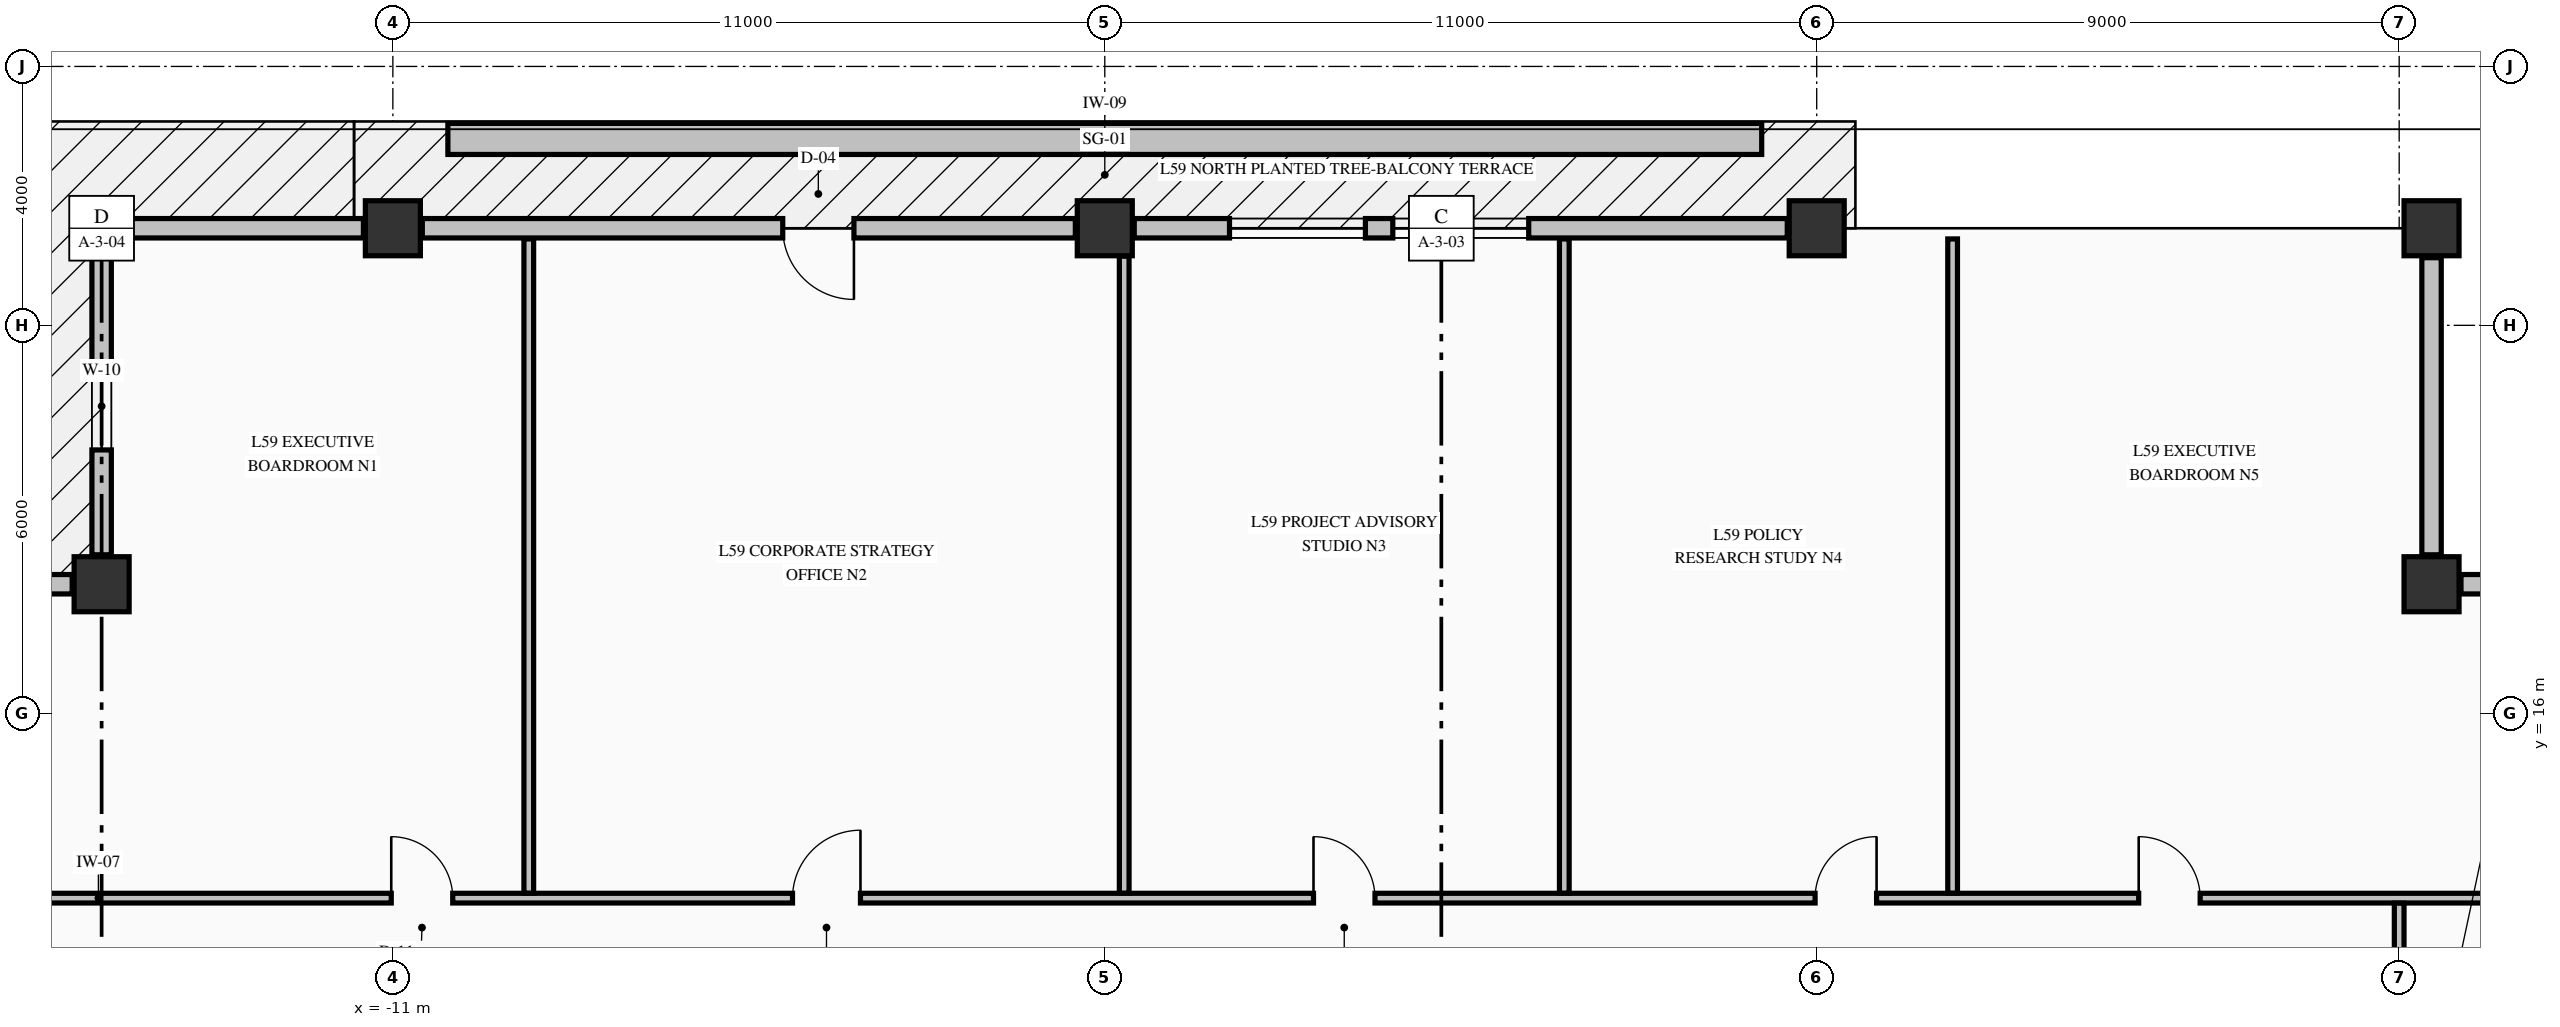
"""IFC4 building model, lengths in metres.
Left out: names, types, materials, properties, quantities, classifications, styles, units other than length and angle.
Written with IfcOpenShell. Run it as: python <this file> out.ifc"""

import sys

from ifc_helpers import new_model, si_unit, direction, frame, frame_2d, origin, origin_2d, place, context, subcontext, project, spatial, rectangle, extrude, element, fill, save


model = new_model("IFC4")
c1 = context("Model", 3, precision=1e-05, world=origin(), true_north=direction((0.0, 1.0)))
c2 = subcontext(c1, "Body", "Model", "MODEL_VIEW")
j1 = project(units=[si_unit("LENGTHUNIT", "METRE"), si_unit("PLANEANGLEUNIT", "RADIAN")], contexts=[c1])
p1 = place(None, origin())
s1 = spatial("IfcSite", under=j1, at=p1, CompositionType="ELEMENT")
p2 = place(p1, origin())
s2 = spatial("IfcBuilding", under=s1, at=p2, CompositionType="ELEMENT")
p3 = place(p2, frame((0.0, 0.0, 226.82)))
s3 = spatial("IfcBuildingStorey", under=s2, at=p3, CompositionType="ELEMENT", Elevation=226.82)
for number, where, z_axis, x_axis in (
    (1, (-15.5, 23.5, -0.425), (0.0, 0.0, 1.0), (1.0, 0.0, 0.0)),
    (2, (-11.0, 23.5, -0.425), (0.0, 0.0, 1.0), (1.0, 0.0, 0.0)),
    (3, (0.0, 23.5, -0.425), (0.0, 0.0, 1.0), (1.0, 0.0, 0.0)),
    (4, (11.0, 23.5, -0.425), (0.0, 0.0, 1.0), (1.0, 0.0, 0.0)),
    (5, (20.5, 23.5, -0.425), (0.0, 0.0, 1.0), (1.0, 0.0, 0.0)),
    (6, (20.5, 18.0, -0.425), (0.0, 0.0, 1.0), (1.0, 0.0, 0.0)),
    (7, (-15.5, 18.0, -0.425), (0.0, 0.0, 1.0), (1.0, 0.0, 0.0)),
):
    element("IfcColumn", number, at=place(p3, frame(where, z_axis=z_axis, x_axis=x_axis)), inside=s3, PredefinedType="COLUMN", context=c2, shape_type="SweptSolid", body=[
        extrude(rectangle(XDim=0.85, YDim=0.85, at=origin_2d()), origin(), (0.0, 0.0, 1.0), 3.405),
    ])
for number, where, z_axis, x_axis in (
    (8, (25.545, 18.0, 0.0), (0.0, 0.0, 1.0), (-1.0, 0.0, 0.0)),
    (9, (20.5, 18.455, 0.0), (0.0, 0.0, 1.0), (0.0, 1.0, 0.0)),
):
    element("IfcWall", number, at=place(p3, frame(where, z_axis=z_axis, x_axis=x_axis)), inside=s3, PredefinedType="STANDARD", context=c2, shape_type="SweptSolid", body=[
        extrude(rectangle(XDim=4.59, YDim=0.3, at=frame_2d((2.295, 0.0))), origin(), (0.0, 0.0, 1.0), 1.172),
    ])
p4 = place(p3, frame((-15.5, 23.045, 0.0), z_axis=(0.0, 0.0, 1.0), x_axis=(0.0, -1.0, 0.0)))
e10 = element("IfcWall", 10, at=p4, inside=s3, PredefinedType="STANDARD", context=c2, shape_type="SweptSolid", body=[
    extrude(rectangle(XDim=4.59, YDim=0.3, at=frame_2d((2.295, 0.0))), origin(), (0.0, 0.0, 1.0), 2.372),
])
p5 = place(p4, frame((1.62, 0.0, 0.68)))
e11 = element("IfcOpeningElement", 11, at=p5, cuts=e10, PredefinedType="OPENING", context=c2, shape_type="SweptSolid", body=[
    extrude(rectangle(XDim=1.35, YDim=1.42, at=frame_2d((0.675, 0.71))), frame((0.0, 0.16, 0.0), z_axis=(0.0, -1.0, 0.0), x_axis=(1.0, 0.0, 0.0)), (0.0, 0.0, 1.0), 0.32),
])
p6 = place(p3, frame((-15.955, 18.0, 0.0), z_axis=(0.0, 0.0, 1.0), x_axis=(-1.0, 0.0, 0.0)))
e12 = element("IfcWall", 12, at=p6, inside=s3, PredefinedType="STANDARD", context=c2, shape_type="SweptSolid", body=[
    extrude(rectangle(XDim=4.59, YDim=0.3, at=frame_2d((2.295, 0.0))), origin(), (0.0, 0.0, 1.0), 2.372),
])
p7 = place(p6, frame((1.62, 0.0, 0.68)))
e13 = element("IfcOpeningElement", 13, at=p7, cuts=e12, PredefinedType="OPENING", context=c2, shape_type="SweptSolid", body=[
    extrude(rectangle(XDim=1.35, YDim=1.42, at=frame_2d((0.675, 0.71))), frame((0.0, 0.16, 0.0), z_axis=(0.0, -1.0, 0.0), x_axis=(1.0, 0.0, 0.0)), (0.0, 0.0, 1.0), 0.32),
])
p8 = place(p3, frame((-11.455, 23.5, 0.0), z_axis=(0.0, 0.0, 1.0), x_axis=(-1.0, 0.0, 0.0)))
e14 = element("IfcWall", 14, at=p8, inside=s3, PredefinedType="STANDARD", context=c2, shape_type="SweptSolid", body=[
    extrude(rectangle(XDim=3.59, YDim=0.3, at=frame_2d((1.795, 0.0))), origin(), (0.0, 0.0, 1.0), 2.372),
])
p9 = place(p3, frame((-0.455, 23.5, 0.0), z_axis=(0.0, 0.0, 1.0), x_axis=(-1.0, 0.0, 0.0)))
e15 = element("IfcWall", 15, at=p9, inside=s3, PredefinedType="STANDARD", context=c2, shape_type="SweptSolid", body=[
    extrude(rectangle(XDim=10.09, YDim=0.3, at=frame_2d((5.045, 0.0))), origin(), (0.0, 0.0, 1.0), 2.372),
])
p10 = place(p9, frame((3.421, 0.0, 0.0)))
e16 = element("IfcOpeningElement", 16, at=p10, cuts=e15, PredefinedType="OPENING", context=c2, shape_type="SweptSolid", body=[
    extrude(rectangle(XDim=1.1, YDim=2.15, at=frame_2d((0.55, 1.075))), frame((0.0, 0.16, 0.0), z_axis=(0.0, -1.0, 0.0), x_axis=(1.0, 0.0, 0.0)), (0.0, 0.0, 1.0), 0.32),
])
p11 = place(p3, frame((10.545, 23.5, 0.0), z_axis=(0.0, 0.0, 1.0), x_axis=(-1.0, 0.0, 0.0)))
e17 = element("IfcWall", 17, at=p11, inside=s3, PredefinedType="STANDARD", context=c2, shape_type="SweptSolid", body=[
    extrude(rectangle(XDim=10.09, YDim=0.3, at=frame_2d((5.045, 0.0))), origin(), (0.0, 0.0, 1.0), 2.372),
])
p12 = place(p11, frame((3.995, 0.0, 0.7)))
e18 = element("IfcOpeningElement", 18, at=p12, cuts=e17, PredefinedType="OPENING", context=c2, shape_type="SweptSolid", body=[
    extrude(rectangle(XDim=2.1, YDim=1.5, at=frame_2d((1.05, 0.75))), frame((0.0, 0.16, 0.0), z_axis=(0.0, -1.0, 0.0), x_axis=(1.0, 0.0, 0.0)), (0.0, 0.0, 1.0), 0.32),
])
p13 = place(p11, frame((6.518, 0.0, 0.7)))
e19 = element("IfcOpeningElement", 19, at=p13, cuts=e17, PredefinedType="OPENING", context=c2, shape_type="SweptSolid", body=[
    extrude(rectangle(XDim=2.1, YDim=1.5, at=frame_2d((1.05, 0.75))), frame((0.0, 0.16, 0.0), z_axis=(0.0, -1.0, 0.0), x_axis=(1.0, 0.0, 0.0)), (0.0, 0.0, 1.0), 0.32),
])
p14 = place(p3, frame((-20.075, 13.15, 0.0), z_axis=(0.0, 0.0, 1.0), x_axis=(1.0, 0.0, 0.0)))
e20 = element("IfcWall", 20, at=p14, inside=s3, PredefinedType="PARTITIONING", context=c2, shape_type="SweptSolid", body=[
    extrude(rectangle(XDim=45.91, YDim=0.15, at=frame_2d((22.955, 0.0))), origin(), (0.0, 0.0, 1.0), 2.98),
])
p15 = place(p14, frame((9.05, 0.0, 0.0)))
e21 = element("IfcOpeningElement", 21, at=p15, cuts=e20, PredefinedType="OPENING", context=c2, shape_type="SweptSolid", body=[
    extrude(rectangle(XDim=0.95, YDim=2.15, at=frame_2d((0.475, 1.075))), frame((0.0, 0.085, 0.0), z_axis=(0.0, -1.0, 0.0), x_axis=(1.0, 0.0, 0.0)), (0.0, 0.0, 1.0), 0.17),
])
p16 = place(p14, frame((15.25, 0.0, 0.0)))
e22 = element("IfcOpeningElement", 22, at=p16, cuts=e20, PredefinedType="OPENING", context=c2, shape_type="SweptSolid", body=[
    extrude(rectangle(XDim=1.05, YDim=2.15, at=frame_2d((0.525, 1.075))), frame((0.0, 0.085, 0.0), z_axis=(0.0, -1.0, 0.0), x_axis=(1.0, 0.0, 0.0)), (0.0, 0.0, 1.0), 0.17),
])
p17 = place(p14, frame((23.3, 0.0, 0.0)))
e23 = element("IfcOpeningElement", 23, at=p17, cuts=e20, PredefinedType="OPENING", context=c2, shape_type="SweptSolid", body=[
    extrude(rectangle(XDim=0.95, YDim=2.15, at=frame_2d((0.475, 1.075))), frame((0.0, 0.085, 0.0), z_axis=(0.0, -1.0, 0.0), x_axis=(1.0, 0.0, 0.0)), (0.0, 0.0, 1.0), 0.17),
])
p18 = place(p14, frame((31.05, 0.0, 0.0)))
e24 = element("IfcOpeningElement", 24, at=p18, cuts=e20, PredefinedType="OPENING", context=c2, shape_type="SweptSolid", body=[
    extrude(rectangle(XDim=0.95, YDim=2.15, at=frame_2d((0.475, 1.075))), frame((0.0, 0.085, 0.0), z_axis=(0.0, -1.0, 0.0), x_axis=(1.0, 0.0, 0.0)), (0.0, 0.0, 1.0), 0.17),
])
p19 = place(p14, frame((36.05, 0.0, 0.0)))
e25 = element("IfcOpeningElement", 25, at=p19, cuts=e20, PredefinedType="OPENING", context=c2, shape_type="SweptSolid", body=[
    extrude(rectangle(XDim=0.95, YDim=2.15, at=frame_2d((0.475, 1.075))), frame((0.0, 0.085, 0.0), z_axis=(0.0, -1.0, 0.0), x_axis=(1.0, 0.0, 0.0)), (0.0, 0.0, 1.0), 0.17),
])
p20 = place(p3, frame((-8.9, 13.228, 0.0), z_axis=(0.0, 0.0, 1.0), x_axis=(0.0, 1.0, 0.0)))
e26 = element("IfcWall", 26, at=p20, inside=s3, PredefinedType="PARTITIONING", context=c2, shape_type="SweptSolid", body=[
    extrude(rectangle(XDim=10.107, YDim=0.15, at=frame_2d((5.053, 0.0))), origin(), (0.0, 0.0, 1.0), 2.98),
])
p21 = place(p3, frame((0.3, 13.228, 0.0), z_axis=(0.0, 0.0, 1.0), x_axis=(0.0, 1.0, 0.0)))
e27 = element("IfcWall", 27, at=p21, inside=s3, PredefinedType="PARTITIONING", context=c2, shape_type="SweptSolid", body=[
    extrude(rectangle(XDim=9.841, YDim=0.15, at=frame_2d((4.92, 0.0))), origin(), (0.0, 0.0, 1.0), 2.395),
])
for number, where, z_axis, x_axis in (
    (28, (7.1, 13.228, 0.0), (0.0, 0.0, 1.0), (0.0, 1.0, 0.0)),
    (29, (13.1, 13.228, 0.0), (0.0, 0.0, 1.0), (0.0, 1.0, 0.0)),
):
    element("IfcWall", number, at=place(p3, frame(where, z_axis=z_axis, x_axis=x_axis)), inside=s3, PredefinedType="PARTITIONING", context=c2, shape_type="SweptSolid", body=[
        extrude(rectangle(XDim=10.107, YDim=0.15, at=frame_2d((5.053, 0.0))), origin(), (0.0, 0.0, 1.0), 2.98),
    ])
p22 = place(p3, frame((20.0, 10.856, 0.0), z_axis=(0.0, 0.0, 1.0), x_axis=(0.0, 1.0, 0.0)))
e30 = element("IfcWall", 30, at=p22, inside=s3, PredefinedType="PARTITIONING", context=c2, shape_type="SweptSolid", body=[
    extrude(rectangle(XDim=2.216, YDim=0.15, at=frame_2d((1.108, 0.0))), origin(), (0.0, 0.0, 1.0), 2.98),
])
p23 = place(p22, frame((0.489, 0.0, 0.0)))
e31 = element("IfcOpeningElement", 31, at=p23, cuts=e30, PredefinedType="OPENING", context=c2, shape_type="SweptSolid", body=[
    extrude(rectangle(XDim=0.95, YDim=2.15, at=frame_2d((0.475, 1.075))), frame((0.0, 0.085, 0.0), z_axis=(0.0, -1.0, 0.0), x_axis=(1.0, 0.0, 0.0)), (0.0, 0.0, 1.0), 0.17),
])
p24 = place(p3, frame((-10.15, 24.88, -0.04), z_axis=(0.0, 0.0, 1.0), x_axis=(1.0, 0.0, 0.0)))
e32 = element("IfcWall", 32, at=p24, inside=s3, PredefinedType="PARAPET", context=c2, shape_type="SweptSolid", body=[
    extrude(rectangle(XDim=20.3, YDim=0.48, at=frame_2d((10.15, 0.0))), origin(), (0.0, 0.0, 1.0), 0.52),
])
p25 = place(p5, origin())
e33 = element("IfcWindow", 33, at=p25, inside=s3, PartitioningType="SINGLE_PANEL", PredefinedType="WINDOW", context=c2, shape_type="SweptSolid", body=[
    extrude(rectangle(XDim=1.35, YDim=1.42, at=frame_2d((0.675, 0.71))), frame((0.0, 0.03, 0.0), z_axis=(0.0, -1.0, 0.0), x_axis=(1.0, 0.0, 0.0)), (0.0, 0.0, 1.0), 0.06),
])
fill(e11, e33)
p26 = place(p10, origin())
e34 = element("IfcDoor", 34, at=p26, inside=s3, OperationType="SINGLE_SWING_LEFT", PredefinedType="DOOR", context=c2, shape_type="SweptSolid", body=[
    extrude(rectangle(XDim=1.1, YDim=2.15, at=frame_2d((0.55, 1.075))), frame((0.0, 0.025, 0.0), z_axis=(0.0, -1.0, 0.0), x_axis=(1.0, 0.0, 0.0)), (0.0, 0.0, 1.0), 0.05),
])
fill(e16, e34)
p27 = place(p12, origin())
e35 = element("IfcWindow", 35, at=p27, inside=s3, PartitioningType="SINGLE_PANEL", PredefinedType="WINDOW", context=c2, shape_type="SweptSolid", body=[
    extrude(rectangle(XDim=2.1, YDim=1.5, at=frame_2d((1.05, 0.75))), frame((0.0, 0.03, 0.0), z_axis=(0.0, -1.0, 0.0), x_axis=(1.0, 0.0, 0.0)), (0.0, 0.0, 1.0), 0.06),
])
fill(e18, e35)
p28 = place(p13, origin())
e36 = element("IfcWindow", 36, at=p28, inside=s3, PartitioningType="SINGLE_PANEL", PredefinedType="WINDOW", context=c2, shape_type="SweptSolid", body=[
    extrude(rectangle(XDim=2.1, YDim=1.5, at=frame_2d((1.05, 0.75))), frame((0.0, 0.03, 0.0), z_axis=(0.0, -1.0, 0.0), x_axis=(1.0, 0.0, 0.0)), (0.0, 0.0, 1.0), 0.06),
])
fill(e19, e36)
p29 = place(p15, origin())
e37 = element("IfcDoor", 37, at=p29, inside=s3, OperationType="SINGLE_SWING_LEFT", PredefinedType="DOOR", context=c2, shape_type="SweptSolid", body=[
    extrude(rectangle(XDim=0.95, YDim=2.15, at=frame_2d((0.475, 1.075))), frame((0.0, 0.025, 0.0), z_axis=(0.0, -1.0, 0.0), x_axis=(1.0, 0.0, 0.0)), (0.0, 0.0, 1.0), 0.05),
])
fill(e21, e37)
p30 = place(p16, origin())
e38 = element("IfcDoor", 38, at=p30, inside=s3, OperationType="SINGLE_SWING_RIGHT", PredefinedType="DOOR", context=c2, shape_type="SweptSolid", body=[
    extrude(rectangle(XDim=1.05, YDim=2.15, at=frame_2d((0.525, 1.075))), frame((0.0, 0.025, 0.0), z_axis=(0.0, -1.0, 0.0), x_axis=(1.0, 0.0, 0.0)), (0.0, 0.0, 1.0), 0.05),
])
fill(e22, e38)
p31 = place(p17, origin())
e39 = element("IfcDoor", 39, at=p31, inside=s3, OperationType="SINGLE_SWING_LEFT", PredefinedType="DOOR", context=c2, shape_type="SweptSolid", body=[
    extrude(rectangle(XDim=0.95, YDim=2.15, at=frame_2d((0.475, 1.075))), frame((0.0, 0.025, 0.0), z_axis=(0.0, -1.0, 0.0), x_axis=(1.0, 0.0, 0.0)), (0.0, 0.0, 1.0), 0.05),
])
fill(e23, e39)
p32 = place(p18, origin())
e40 = element("IfcDoor", 40, at=p32, inside=s3, OperationType="SINGLE_SWING_RIGHT", PredefinedType="DOOR", context=c2, shape_type="SweptSolid", body=[
    extrude(rectangle(XDim=0.95, YDim=2.15, at=frame_2d((0.475, 1.075))), frame((0.0, 0.025, 0.0), z_axis=(0.0, -1.0, 0.0), x_axis=(1.0, 0.0, 0.0)), (0.0, 0.0, 1.0), 0.05),
])
fill(e24, e40)
p33 = place(p19, origin())
e41 = element("IfcDoor", 41, at=p33, inside=s3, OperationType="SINGLE_SWING_LEFT", PredefinedType="DOOR", context=c2, shape_type="SweptSolid", body=[
    extrude(rectangle(XDim=0.95, YDim=2.15, at=frame_2d((0.475, 1.075))), frame((0.0, 0.025, 0.0), z_axis=(0.0, -1.0, 0.0), x_axis=(1.0, 0.0, 0.0)), (0.0, 0.0, 1.0), 0.05),
])
fill(e25, e41)
save(model, sys.argv[1])
